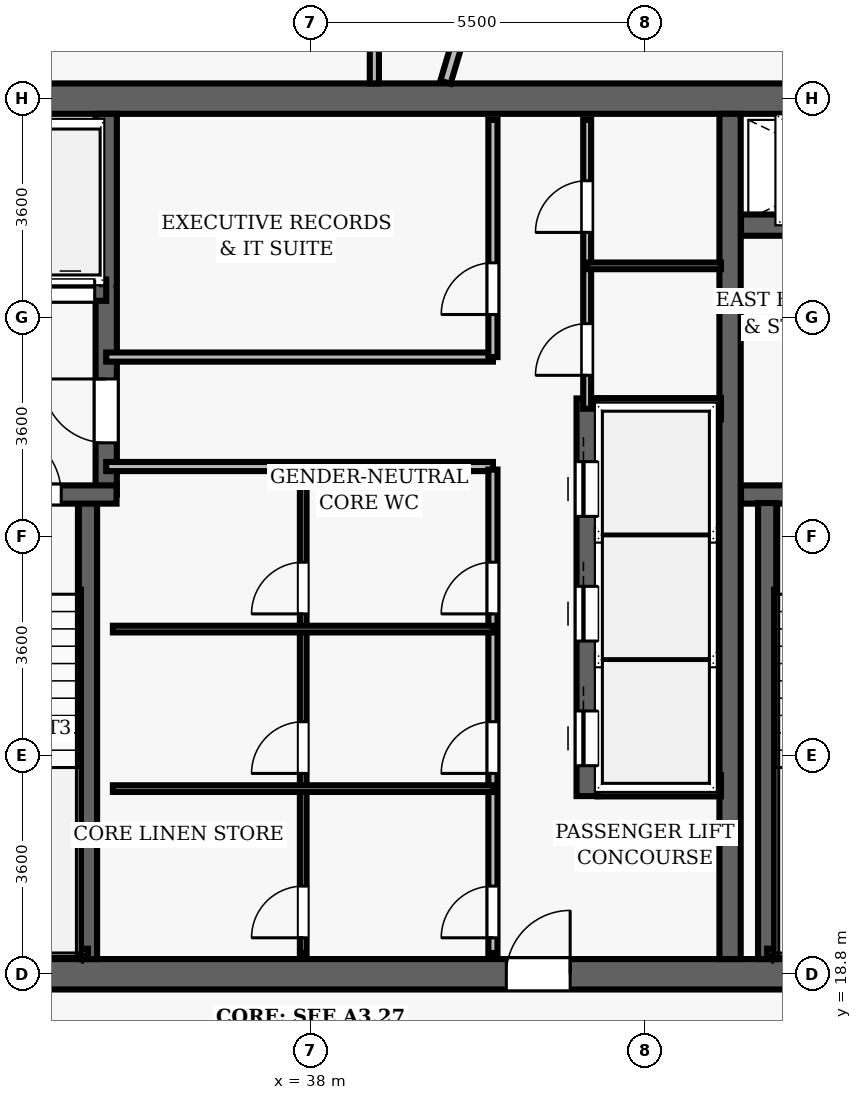
"""IFC4 building model, lengths in metres.
Left out: names, types, materials, properties, quantities, classifications, styles, units other than length and angle.
Written with IfcOpenShell. Run it as: python <this file> out.ifc"""

import sys

from ifc_helpers import new_model, si_unit, direction, frame, frame_2d, origin, place, context, subcontext, project, spatial, rectangle, extrude, element, fill, save


model = new_model("IFC4")
c1 = context("Model", 3, precision=1e-05, world=origin(), true_north=direction((0.0, 1.0)))
c2 = subcontext(c1, "Body", "Model", "MODEL_VIEW")
j1 = project(units=[si_unit("LENGTHUNIT", "METRE"), si_unit("PLANEANGLEUNIT", "RADIAN")], contexts=[c1])
p1 = place(None, origin())
s1 = spatial("IfcSite", under=j1, at=p1, CompositionType="ELEMENT")
p2 = place(p1, origin())
s2 = spatial("IfcBuilding", under=s1, at=p2, CompositionType="ELEMENT")
p3 = place(p2, frame((0.0, 0.0, 272.85)))
s3 = spatial("IfcBuildingStorey", under=s2, at=p3, CompositionType="ELEMENT", Elevation=272.85)
p4 = place(p3, frame((26.75, 18.8, 0.0), z_axis=(0.0, 0.0, 1.0), x_axis=(1.0, 0.0, 0.0)))
e1 = element("IfcWall", 1, at=p4, inside=s3, PredefinedType="SHEAR", context=c2, shape_type="SweptSolid", body=[
    extrude(rectangle(XDim=22.5, YDim=0.5, at=frame_2d((11.25, 0.0))), origin(), (0.0, 0.0, 1.0), 3.85),
])
p5 = place(p4, frame((14.47, 0.0, 0.0)))
e2 = element("IfcOpeningElement", 2, at=p5, cuts=e1, PredefinedType="OPENING", context=c2, shape_type="SweptSolid", body=[
    extrude(rectangle(XDim=1.05, YDim=2.15, at=frame_2d((0.525, 1.075))), frame((0.0, 0.26, 0.0), z_axis=(0.0, -1.0, 0.0), x_axis=(1.0, 0.0, 0.0)), (0.0, 0.0, 1.0), 0.52),
])
p6 = place(p3, frame((26.75, 33.2, 0.0), z_axis=(0.0, 0.0, 1.0), x_axis=(1.0, 0.0, 0.0)))
e3 = element("IfcWall", 3, at=p6, inside=s3, PredefinedType="SHEAR", context=c2, shape_type="SweptSolid", body=[
    extrude(rectangle(XDim=22.5, YDim=0.5, at=frame_2d((11.25, 0.0))), origin(), (0.0, 0.0, 1.0), 3.85),
])
p7 = place(p3, frame((44.9, 19.05, 0.0), z_axis=(0.0, 0.0, 1.0), x_axis=(0.0, 1.0, 0.0)))
e4 = element("IfcWall", 4, at=p7, inside=s3, PredefinedType="SHEAR", context=c2, shape_type="SweptSolid", body=[
    extrude(rectangle(XDim=13.9, YDim=0.35, at=frame_2d((6.95, 0.0))), origin(), (0.0, 0.0, 1.0), 3.85),
])
p8 = place(p3, frame((45.08, 26.69, 0.0), z_axis=(0.0, 0.0, 1.0), x_axis=(1.0, 0.0, 0.0)))
e5 = element("IfcWall", 5, at=p8, inside=s3, PredefinedType="SHEAR", context=c2, shape_type="SweptSolid", body=[
    extrude(rectangle(XDim=3.67, YDim=0.3, at=frame_2d((1.835, 0.0))), origin(), (0.0, 0.0, 1.0), 3.85),
])
p9 = place(p8, frame((1.05, 0.0, 0.0)))
e6 = element("IfcOpeningElement", 6, at=p9, cuts=e5, PredefinedType="OPENING", context=c2, shape_type="SweptSolid", body=[
    extrude(rectangle(XDim=1.1, YDim=2.15, at=frame_2d((0.55, 1.075))), frame((0.0, 0.16, 0.0), z_axis=(0.0, -1.0, 0.0), x_axis=(1.0, 0.0, 0.0)), (0.0, 0.0, 1.0), 0.32),
])
p10 = place(p3, frame((45.51, 19.05, 0.0), z_axis=(0.0, 0.0, 1.0), x_axis=(0.0, 1.0, 0.0)))
e7 = element("IfcWall", 7, at=p10, inside=s3, PredefinedType="SHEAR", context=c2, shape_type="SweptSolid", body=[
    extrude(rectangle(XDim=7.5, YDim=0.3, at=frame_2d((3.75, 0.0))), origin(), (0.0, 0.0, 1.0), 3.85),
])
p11 = place(p3, frame((45.51, 19.16, 0.0), z_axis=(0.0, 0.0, 1.0), x_axis=(1.0, 0.0, 0.0)))
e8 = element("IfcWall", 8, at=p11, inside=s3, PredefinedType="SHEAR", context=c2, shape_type="SweptSolid", body=[
    extrude(rectangle(XDim=3.095, YDim=0.12, at=frame_2d((1.547, 0.0))), origin(), (0.0, 0.0, 1.0), 3.85),
])
p12 = place(p3, frame((45.08, 31.12, 0.0), z_axis=(0.0, 0.0, 1.0), x_axis=(1.0, 0.0, 0.0)))
e9 = element("IfcWall", 9, at=p12, inside=s3, PredefinedType="SHEAR", context=c2, shape_type="SweptSolid", body=[
    extrude(rectangle(XDim=3.67, YDim=0.35, at=frame_2d((1.835, 0.0))), origin(), (0.0, 0.0, 1.0), 3.04),
])
p13 = place(p12, frame((1.25, 0.0, 0.0)))
e10 = element("IfcOpeningElement", 10, at=p13, cuts=e9, PredefinedType="OPENING", context=c2, shape_type="SweptSolid", body=[
    extrude(rectangle(XDim=1.1, YDim=2.15, at=frame_2d((0.55, 1.075))), frame((0.0, 0.185, 0.0), z_axis=(0.0, -1.0, 0.0), x_axis=(1.0, 0.0, 0.0)), (0.0, 0.0, 1.0), 0.37),
])
p14 = place(p3, frame((34.34, 19.05, 0.0), z_axis=(0.0, 0.0, 1.0), x_axis=(0.0, 1.0, 0.0)))
e11 = element("IfcWall", 11, at=p14, inside=s3, PredefinedType="SHEAR", context=c2, shape_type="SweptSolid", body=[
    extrude(rectangle(XDim=7.5, YDim=0.3, at=frame_2d((3.75, 0.0))), origin(), (0.0, 0.0, 1.0), 3.85),
])
p15 = place(p3, frame((34.64, 26.69, 0.0), z_axis=(0.0, 0.0, 1.0), x_axis=(0.0, 1.0, 0.0)))
e12 = element("IfcWall", 12, at=p15, inside=s3, PredefinedType="SHEAR", context=c2, shape_type="SweptSolid", body=[
    extrude(rectangle(XDim=6.26, YDim=0.35, at=frame_2d((3.13, 0.0))), origin(), (0.0, 0.0, 1.0), 3.85),
])
p16 = place(p15, frame((0.85, 0.0, 0.0)))
e13 = element("IfcOpeningElement", 13, at=p16, cuts=e12, PredefinedType="OPENING", context=c2, shape_type="SweptSolid", body=[
    extrude(rectangle(XDim=1.05, YDim=2.15, at=frame_2d((0.525, 1.075))), frame((0.0, 0.185, 0.0), z_axis=(0.0, -1.0, 0.0), x_axis=(1.0, 0.0, 0.0)), (0.0, 0.0, 1.0), 0.37),
])
p17 = place(p3, frame((31.25, 26.69, 0.0), z_axis=(0.0, 0.0, 1.0), x_axis=(1.0, 0.0, 0.0)))
e14 = element("IfcWall", 14, at=p17, inside=s3, PredefinedType="SHEAR", context=c2, shape_type="SweptSolid", body=[
    extrude(rectangle(XDim=3.56, YDim=0.3, at=frame_2d((1.78, 0.0))), origin(), (0.0, 0.0, 1.0), 3.85),
])
p18 = place(p17, frame((1.55, 0.0, 0.0)))
e15 = element("IfcOpeningElement", 15, at=p18, cuts=e14, PredefinedType="OPENING", context=c2, shape_type="SweptSolid", body=[
    extrude(rectangle(XDim=1.1, YDim=2.15, at=frame_2d((0.55, 1.075))), frame((0.0, 0.16, 0.0), z_axis=(0.0, -1.0, 0.0), x_axis=(1.0, 0.0, 0.0)), (0.0, 0.0, 1.0), 0.32),
])
p19 = place(p3, frame((31.3, 19.16, 0.0), z_axis=(0.0, 0.0, 1.0), x_axis=(1.0, 0.0, 0.0)))
e16 = element("IfcWall", 16, at=p19, inside=s3, PredefinedType="SHEAR", context=c2, shape_type="SweptSolid", body=[
    extrude(rectangle(XDim=3.04, YDim=0.12, at=frame_2d((1.52, 0.0))), origin(), (0.0, 0.0, 1.0), 3.85),
])
p20 = place(p3, frame((32.23, 30.05, 0.0), z_axis=(0.0, 0.0, 1.0), x_axis=(1.0, 0.0, 0.0)))
e17 = element("IfcWall", 17, at=p20, inside=s3, PredefinedType="SHEAR", context=c2, shape_type="SweptSolid", body=[
    extrude(rectangle(XDim=2.41, YDim=0.35, at=frame_2d((1.205, 0.0))), origin(), (0.0, 0.0, 1.0), 3.04),
])
p21 = place(p20, frame((0.42, 0.0, 0.0)))
e18 = element("IfcOpeningElement", 18, at=p21, cuts=e17, PredefinedType="OPENING", context=c2, shape_type="SweptSolid", body=[
    extrude(rectangle(XDim=0.8, YDim=2.15, at=frame_2d((0.4, 1.075))), frame((0.0, 0.185, 0.0), z_axis=(0.0, -1.0, 0.0), x_axis=(1.0, 0.0, 0.0)), (0.0, 0.0, 1.0), 0.37),
])
p22 = place(p20, frame((1.42, 0.0, 0.0)))
e19 = element("IfcOpeningElement", 19, at=p22, cuts=e17, PredefinedType="OPENING", context=c2, shape_type="SweptSolid", body=[
    extrude(rectangle(XDim=0.8, YDim=2.15, at=frame_2d((0.4, 1.075))), frame((0.0, 0.185, 0.0), z_axis=(0.0, -1.0, 0.0), x_axis=(1.0, 0.0, 0.0)), (0.0, 0.0, 1.0), 0.37),
])
p23 = place(p3, frame((42.55, 21.73, 0.0), z_axis=(0.0, 0.0, 1.0), x_axis=(0.0, 1.0, 0.0)))
e20 = element("IfcWall", 20, at=p23, inside=s3, PredefinedType="SHEAR", context=c2, shape_type="SweptSolid", body=[
    extrude(rectangle(XDim=6.54, YDim=0.35, at=frame_2d((3.27, 0.0))), origin(), (0.0, 0.0, 1.0), 3.04),
])
p24 = place(p23, frame((0.5, 0.0, 0.0)))
e21 = element("IfcOpeningElement", 21, at=p24, cuts=e20, PredefinedType="OPENING", context=c2, shape_type="SweptSolid", body=[
    extrude(rectangle(XDim=0.9, YDim=2.15, at=frame_2d((0.45, 1.075))), frame((0.0, 0.185, 0.0), z_axis=(0.0, -1.0, 0.0), x_axis=(1.0, 0.0, 0.0)), (0.0, 0.0, 1.0), 0.37),
])
p25 = place(p23, frame((2.55, 0.0, 0.0)))
e22 = element("IfcOpeningElement", 22, at=p25, cuts=e20, PredefinedType="OPENING", context=c2, shape_type="SweptSolid", body=[
    extrude(rectangle(XDim=0.9, YDim=2.15, at=frame_2d((0.45, 1.075))), frame((0.0, 0.185, 0.0), z_axis=(0.0, -1.0, 0.0), x_axis=(1.0, 0.0, 0.0)), (0.0, 0.0, 1.0), 0.37),
])
p26 = place(p23, frame((4.6, 0.0, 0.0)))
e23 = element("IfcOpeningElement", 23, at=p26, cuts=e20, PredefinedType="OPENING", context=c2, shape_type="SweptSolid", body=[
    extrude(rectangle(XDim=0.9, YDim=2.15, at=frame_2d((0.45, 1.075))), frame((0.0, 0.185, 0.0), z_axis=(0.0, -1.0, 0.0), x_axis=(1.0, 0.0, 0.0)), (0.0, 0.0, 1.0), 0.37),
])
for number, where, z_axis, x_axis in (
    (24, (42.72, 21.9, 0.0), (0.0, 0.0, 1.0), (1.0, 0.0, 0.0)),
    (25, (42.72, 28.1, 0.0), (0.0, 0.0, 1.0), (1.0, 0.0, 0.0)),
):
    element("IfcWall", number, at=place(p3, frame(where, z_axis=z_axis, x_axis=x_axis)), inside=s3, PredefinedType="SHEAR", context=c2, shape_type="SweptSolid", body=[
        extrude(rectangle(XDim=2.03, YDim=0.35, at=frame_2d((1.015, 0.0))), origin(), (0.0, 0.0, 1.0), 3.04),
    ])
for number, where, z_axis, x_axis in (
    (26, (34.64, 27.15, 0.0), (0.0, 0.0, 1.0), (1.0, 0.0, 0.0)),
    (27, (34.64, 28.95, 0.0), (0.0, 0.0, 1.0), (1.0, 0.0, 0.0)),
):
    element("IfcWall", number, at=place(p3, frame(where, z_axis=z_axis, x_axis=x_axis)), inside=s3, PredefinedType="PARTITIONING", context=c2, shape_type="SweptSolid", body=[
        extrude(rectangle(XDim=6.36, YDim=0.15, at=frame_2d((3.18, 0.0))), origin(), (0.0, 0.0, 1.0), 3.04),
    ])
p27 = place(p3, frame((41.0, 28.95, 0.0), z_axis=(0.0, 0.0, 1.0), x_axis=(0.0, 1.0, 0.0)))
e28 = element("IfcWall", 28, at=p27, inside=s3, PredefinedType="PARTITIONING", context=c2, shape_type="SweptSolid", body=[
    extrude(rectangle(XDim=3.9, YDim=0.15, at=frame_2d((1.95, 0.0))), origin(), (0.0, 0.0, 1.0), 3.04),
])
p28 = place(p27, frame((0.7, 0.0, 0.0)))
e29 = element("IfcOpeningElement", 29, at=p28, cuts=e28, PredefinedType="OPENING", context=c2, shape_type="SweptSolid", body=[
    extrude(rectangle(XDim=0.85, YDim=2.1, at=frame_2d((0.425, 1.05))), frame((0.0, 0.085, 0.0), z_axis=(0.0, -1.0, 0.0), x_axis=(1.0, 0.0, 0.0)), (0.0, 0.0, 1.0), 0.17),
])
p29 = place(p3, frame((41.0, 19.15, 0.0), z_axis=(0.0, 0.0, 1.0), x_axis=(0.0, 1.0, 0.0)))
e30 = element("IfcWall", 30, at=p29, inside=s3, PredefinedType="PARTITIONING", context=c2, shape_type="SweptSolid", body=[
    extrude(rectangle(XDim=7.95, YDim=0.15, at=frame_2d((3.975, 0.0))), origin(), (0.0, 0.0, 1.0), 3.04),
])
p30 = place(p29, frame((0.25, 0.0, 0.0)))
e31 = element("IfcOpeningElement", 31, at=p30, cuts=e30, PredefinedType="OPENING", context=c2, shape_type="SweptSolid", body=[
    extrude(rectangle(XDim=0.85, YDim=2.1, at=frame_2d((0.425, 1.05))), frame((0.0, 0.085, 0.0), z_axis=(0.0, -1.0, 0.0), x_axis=(1.0, 0.0, 0.0)), (0.0, 0.0, 1.0), 0.17),
])
p31 = place(p29, frame((2.953, 0.0, 0.0)))
e32 = element("IfcOpeningElement", 32, at=p31, cuts=e30, PredefinedType="OPENING", context=c2, shape_type="SweptSolid", body=[
    extrude(rectangle(XDim=0.85, YDim=2.1, at=frame_2d((0.425, 1.05))), frame((0.0, 0.085, 0.0), z_axis=(0.0, -1.0, 0.0), x_axis=(1.0, 0.0, 0.0)), (0.0, 0.0, 1.0), 0.17),
])
p32 = place(p29, frame((5.576, 0.0, 0.0)))
e33 = element("IfcOpeningElement", 33, at=p32, cuts=e30, PredefinedType="OPENING", context=c2, shape_type="SweptSolid", body=[
    extrude(rectangle(XDim=0.85, YDim=2.1, at=frame_2d((0.425, 1.05))), frame((0.0, 0.085, 0.0), z_axis=(0.0, -1.0, 0.0), x_axis=(1.0, 0.0, 0.0)), (0.0, 0.0, 1.0), 0.17),
])
p33 = place(p3, frame((37.88, 19.15, 0.0), z_axis=(0.0, 0.0, 1.0), x_axis=(0.0, 1.0, 0.0)))
e34 = element("IfcWall", 34, at=p33, inside=s3, PredefinedType="PARTITIONING", context=c2, shape_type="SweptSolid", body=[
    extrude(rectangle(XDim=7.95, YDim=0.11, at=frame_2d((3.975, 0.0))), origin(), (0.0, 0.0, 1.0), 3.04),
])
p34 = place(p33, frame((0.25, 0.0, 0.0)))
e35 = element("IfcOpeningElement", 35, at=p34, cuts=e34, PredefinedType="OPENING", context=c2, shape_type="SweptSolid", body=[
    extrude(rectangle(XDim=0.85, YDim=2.1, at=frame_2d((0.425, 1.05))), frame((0.0, 0.065, 0.0), z_axis=(0.0, -1.0, 0.0), x_axis=(1.0, 0.0, 0.0)), (0.0, 0.0, 1.0), 0.13),
])
p35 = place(p33, frame((2.953, 0.0, 0.0)))
e36 = element("IfcOpeningElement", 36, at=p35, cuts=e34, PredefinedType="OPENING", context=c2, shape_type="SweptSolid", body=[
    extrude(rectangle(XDim=0.85, YDim=2.1, at=frame_2d((0.425, 1.05))), frame((0.0, 0.065, 0.0), z_axis=(0.0, -1.0, 0.0), x_axis=(1.0, 0.0, 0.0)), (0.0, 0.0, 1.0), 0.13),
])
p36 = place(p33, frame((5.576, 0.0, 0.0)))
e37 = element("IfcOpeningElement", 37, at=p36, cuts=e34, PredefinedType="OPENING", context=c2, shape_type="SweptSolid", body=[
    extrude(rectangle(XDim=0.85, YDim=2.1, at=frame_2d((0.425, 1.05))), frame((0.0, 0.065, 0.0), z_axis=(0.0, -1.0, 0.0), x_axis=(1.0, 0.0, 0.0)), (0.0, 0.0, 1.0), 0.13),
])
for number, where, z_axis, x_axis in (
    (38, (34.75, 21.853, 0.0), (0.0, 0.0, 1.0), (1.0, 0.0, 0.0)),
    (39, (34.75, 24.477, 0.0), (0.0, 0.0, 1.0), (1.0, 0.0, 0.0)),
):
    element("IfcWall", number, at=place(p3, frame(where, z_axis=z_axis, x_axis=x_axis)), inside=s3, PredefinedType="PARTITIONING", context=c2, shape_type="SweptSolid", body=[
        extrude(rectangle(XDim=6.25, YDim=0.11, at=frame_2d((3.125, 0.0))), origin(), (0.0, 0.0, 1.0), 3.04),
    ])
p37 = place(p3, frame((42.55, 28.1, 0.0), z_axis=(0.0, 0.0, 1.0), x_axis=(0.0, 1.0, 0.0)))
e40 = element("IfcWall", 40, at=p37, inside=s3, PredefinedType="PARTITIONING", context=c2, shape_type="SweptSolid", body=[
    extrude(rectangle(XDim=4.75, YDim=0.13, at=frame_2d((2.375, 0.0))), origin(), (0.0, 0.0, 1.0), 3.04),
])
p38 = place(p37, frame((0.55, 0.0, 0.0)))
e41 = element("IfcOpeningElement", 41, at=p38, cuts=e40, PredefinedType="OPENING", context=c2, shape_type="SweptSolid", body=[
    extrude(rectangle(XDim=0.85, YDim=2.1, at=frame_2d((0.425, 1.05))), frame((0.0, 0.075, 0.0), z_axis=(0.0, -1.0, 0.0), x_axis=(1.0, 0.0, 0.0)), (0.0, 0.0, 1.0), 0.15),
])
p39 = place(p37, frame((2.9, 0.0, 0.0)))
e42 = element("IfcOpeningElement", 42, at=p39, cuts=e40, PredefinedType="OPENING", context=c2, shape_type="SweptSolid", body=[
    extrude(rectangle(XDim=0.85, YDim=2.1, at=frame_2d((0.425, 1.05))), frame((0.0, 0.075, 0.0), z_axis=(0.0, -1.0, 0.0), x_axis=(1.0, 0.0, 0.0)), (0.0, 0.0, 1.0), 0.15),
])
p40 = place(p3, frame((42.55, 30.45, 0.0), z_axis=(0.0, 0.0, 1.0), x_axis=(1.0, 0.0, 0.0)))
e43 = element("IfcWall", 43, at=p40, inside=s3, PredefinedType="PARTITIONING", context=c2, shape_type="SweptSolid", body=[
    extrude(rectangle(XDim=2.2, YDim=0.11, at=frame_2d((1.1, 0.0))), origin(), (0.0, 0.0, 1.0), 3.04),
])
p41 = place(p3, frame((39.05, 33.45, 0.0), z_axis=(0.0, 0.0, 1.0), x_axis=(0.0, 1.0, 0.0)))
e44 = element("IfcWall", 44, at=p41, inside=s3, PredefinedType="PARTITIONING", context=c2, shape_type="SweptSolid", body=[
    extrude(rectangle(XDim=6.95, YDim=0.15, at=frame_2d((3.475, 0.0))), origin(), (0.0, 0.0, 1.0), 3.04),
])
p42 = place(p41, frame((1.262, 0.0, 0.0)))
e45 = element("IfcOpeningElement", 45, at=p42, cuts=e44, PredefinedType="OPENING", context=c2, shape_type="SweptSolid", body=[
    extrude(rectangle(XDim=0.95, YDim=2.15, at=frame_2d((0.475, 1.075))), frame((0.0, 0.085, 0.0), z_axis=(0.0, -1.0, 0.0), x_axis=(1.0, 0.0, 0.0)), (0.0, 0.0, 1.0), 0.17),
])
p43 = place(p3, frame((40.219, 33.47, 0.0), z_axis=(0.0, 0.0, 1.0), x_axis=(0.284773538312, 0.958594821537, 0.0)))
e46 = element("IfcWall", 46, at=p43, inside=s3, PredefinedType="PARTITIONING", context=c2, shape_type="SweptSolid", body=[
    extrude(rectangle(XDim=13.282, YDim=0.175, at=frame_2d((6.641, 0.0))), origin(), (0.0, 0.0, 1.0), 3.04),
])
p44 = place(p18, origin())
e47 = element("IfcDoor", 47, at=p44, inside=s3, OperationType="SINGLE_SWING_LEFT", PredefinedType="DOOR", context=c2, shape_type="SweptSolid", body=[
    extrude(rectangle(XDim=1.1, YDim=2.15, at=frame_2d((0.55, 1.075))), frame((0.0, 0.025, 0.0), z_axis=(0.0, -1.0, 0.0), x_axis=(1.0, 0.0, 0.0)), (0.0, 0.0, 1.0), 0.05),
])
fill(e15, e47)
p45 = place(p5, origin())
e48 = element("IfcDoor", 48, at=p45, inside=s3, OperationType="SINGLE_SWING_RIGHT", PredefinedType="DOOR", context=c2, shape_type="SweptSolid", body=[
    extrude(rectangle(XDim=1.05, YDim=2.15, at=frame_2d((0.525, 1.075))), frame((0.0, 0.025, 0.0), z_axis=(0.0, -1.0, 0.0), x_axis=(1.0, 0.0, 0.0)), (0.0, 0.0, 1.0), 0.05),
])
fill(e2, e48)
p46 = place(p16, origin())
e49 = element("IfcDoor", 49, at=p46, inside=s3, OperationType="SINGLE_SWING_RIGHT", PredefinedType="DOOR", context=c2, shape_type="SweptSolid", body=[
    extrude(rectangle(XDim=1.05, YDim=2.15, at=frame_2d((0.525, 1.075))), frame((0.0, 0.025, 0.0), z_axis=(0.0, -1.0, 0.0), x_axis=(1.0, 0.0, 0.0)), (0.0, 0.0, 1.0), 0.05),
])
fill(e13, e49)
p47 = place(p28, origin())
e50 = element("IfcDoor", 50, at=p47, inside=s3, OperationType="SINGLE_SWING_LEFT", PredefinedType="DOOR", context=c2, shape_type="SweptSolid", body=[
    extrude(rectangle(XDim=0.85, YDim=2.1, at=frame_2d((0.425, 1.05))), frame((0.0, 0.025, 0.0), z_axis=(0.0, -1.0, 0.0), x_axis=(1.0, 0.0, 0.0)), (0.0, 0.0, 1.0), 0.05),
])
fill(e29, e50)
p48 = place(p30, origin())
e51 = element("IfcDoor", 51, at=p48, inside=s3, OperationType="SINGLE_SWING_LEFT", PredefinedType="DOOR", context=c2, shape_type="SweptSolid", body=[
    extrude(rectangle(XDim=0.85, YDim=2.1, at=frame_2d((0.425, 1.05))), frame((0.0, 0.025, 0.0), z_axis=(0.0, -1.0, 0.0), x_axis=(1.0, 0.0, 0.0)), (0.0, 0.0, 1.0), 0.05),
])
fill(e31, e51)
p49 = place(p34, origin())
e52 = element("IfcDoor", 52, at=p49, inside=s3, OperationType="SINGLE_SWING_LEFT", PredefinedType="DOOR", context=c2, shape_type="SweptSolid", body=[
    extrude(rectangle(XDim=0.85, YDim=2.1, at=frame_2d((0.425, 1.05))), frame((0.0, 0.025, 0.0), z_axis=(0.0, -1.0, 0.0), x_axis=(1.0, 0.0, 0.0)), (0.0, 0.0, 1.0), 0.05),
])
fill(e35, e52)
p50 = place(p31, origin())
e53 = element("IfcDoor", 53, at=p50, inside=s3, OperationType="SINGLE_SWING_LEFT", PredefinedType="DOOR", context=c2, shape_type="SweptSolid", body=[
    extrude(rectangle(XDim=0.85, YDim=2.1, at=frame_2d((0.425, 1.05))), frame((0.0, 0.025, 0.0), z_axis=(0.0, -1.0, 0.0), x_axis=(1.0, 0.0, 0.0)), (0.0, 0.0, 1.0), 0.05),
])
fill(e32, e53)
p51 = place(p35, origin())
e54 = element("IfcDoor", 54, at=p51, inside=s3, OperationType="SINGLE_SWING_LEFT", PredefinedType="DOOR", context=c2, shape_type="SweptSolid", body=[
    extrude(rectangle(XDim=0.85, YDim=2.1, at=frame_2d((0.425, 1.05))), frame((0.0, 0.025, 0.0), z_axis=(0.0, -1.0, 0.0), x_axis=(1.0, 0.0, 0.0)), (0.0, 0.0, 1.0), 0.05),
])
fill(e36, e54)
p52 = place(p32, origin())
e55 = element("IfcDoor", 55, at=p52, inside=s3, OperationType="SINGLE_SWING_LEFT", PredefinedType="DOOR", context=c2, shape_type="SweptSolid", body=[
    extrude(rectangle(XDim=0.85, YDim=2.1, at=frame_2d((0.425, 1.05))), frame((0.0, 0.025, 0.0), z_axis=(0.0, -1.0, 0.0), x_axis=(1.0, 0.0, 0.0)), (0.0, 0.0, 1.0), 0.05),
])
fill(e33, e55)
p53 = place(p36, origin())
e56 = element("IfcDoor", 56, at=p53, inside=s3, OperationType="SINGLE_SWING_LEFT", PredefinedType="DOOR", context=c2, shape_type="SweptSolid", body=[
    extrude(rectangle(XDim=0.85, YDim=2.1, at=frame_2d((0.425, 1.05))), frame((0.0, 0.025, 0.0), z_axis=(0.0, -1.0, 0.0), x_axis=(1.0, 0.0, 0.0)), (0.0, 0.0, 1.0), 0.05),
])
fill(e37, e56)
p54 = place(p38, origin())
e57 = element("IfcDoor", 57, at=p54, inside=s3, OperationType="SINGLE_SWING_LEFT", PredefinedType="DOOR", context=c2, shape_type="SweptSolid", body=[
    extrude(rectangle(XDim=0.85, YDim=2.1, at=frame_2d((0.425, 1.05))), frame((0.0, 0.025, 0.0), z_axis=(0.0, -1.0, 0.0), x_axis=(1.0, 0.0, 0.0)), (0.0, 0.0, 1.0), 0.05),
])
fill(e41, e57)
p55 = place(p39, origin())
e58 = element("IfcDoor", 58, at=p55, inside=s3, OperationType="SINGLE_SWING_LEFT", PredefinedType="DOOR", context=c2, shape_type="SweptSolid", body=[
    extrude(rectangle(XDim=0.85, YDim=2.1, at=frame_2d((0.425, 1.05))), frame((0.0, 0.025, 0.0), z_axis=(0.0, -1.0, 0.0), x_axis=(1.0, 0.0, 0.0)), (0.0, 0.0, 1.0), 0.05),
])
fill(e42, e58)
p56 = place(p24, origin())
e59 = element("IfcDoor", 59, at=p56, inside=s3, OperationType="SLIDING_TO_LEFT", PredefinedType="DOOR", context=c2, shape_type="SweptSolid", body=[
    extrude(rectangle(XDim=0.9, YDim=2.15, at=frame_2d((0.45, 1.075))), frame((0.0, 0.025, 0.0), z_axis=(0.0, -1.0, 0.0), x_axis=(1.0, 0.0, 0.0)), (0.0, 0.0, 1.0), 0.05),
])
fill(e21, e59)
p57 = place(p25, origin())
e60 = element("IfcDoor", 60, at=p57, inside=s3, OperationType="SLIDING_TO_LEFT", PredefinedType="DOOR", context=c2, shape_type="SweptSolid", body=[
    extrude(rectangle(XDim=0.9, YDim=2.15, at=frame_2d((0.45, 1.075))), frame((0.0, 0.025, 0.0), z_axis=(0.0, -1.0, 0.0), x_axis=(1.0, 0.0, 0.0)), (0.0, 0.0, 1.0), 0.05),
])
fill(e22, e60)
p58 = place(p26, origin())
e61 = element("IfcDoor", 61, at=p58, inside=s3, OperationType="SLIDING_TO_LEFT", PredefinedType="DOOR", context=c2, shape_type="SweptSolid", body=[
    extrude(rectangle(XDim=0.9, YDim=2.15, at=frame_2d((0.45, 1.075))), frame((0.0, 0.025, 0.0), z_axis=(0.0, -1.0, 0.0), x_axis=(1.0, 0.0, 0.0)), (0.0, 0.0, 1.0), 0.05),
])
fill(e23, e61)
p59 = place(p22, origin())
e62 = element("IfcDoor", 62, at=p59, inside=s3, OperationType="SLIDING_TO_LEFT", PredefinedType="DOOR", context=c2, shape_type="SweptSolid", body=[
    extrude(rectangle(XDim=0.8, YDim=2.15, at=frame_2d((0.4, 1.075))), frame((0.0, 0.025, 0.0), z_axis=(0.0, -1.0, 0.0), x_axis=(1.0, 0.0, 0.0)), (0.0, 0.0, 1.0), 0.05),
])
fill(e19, e62)
save(model, sys.argv[1])
